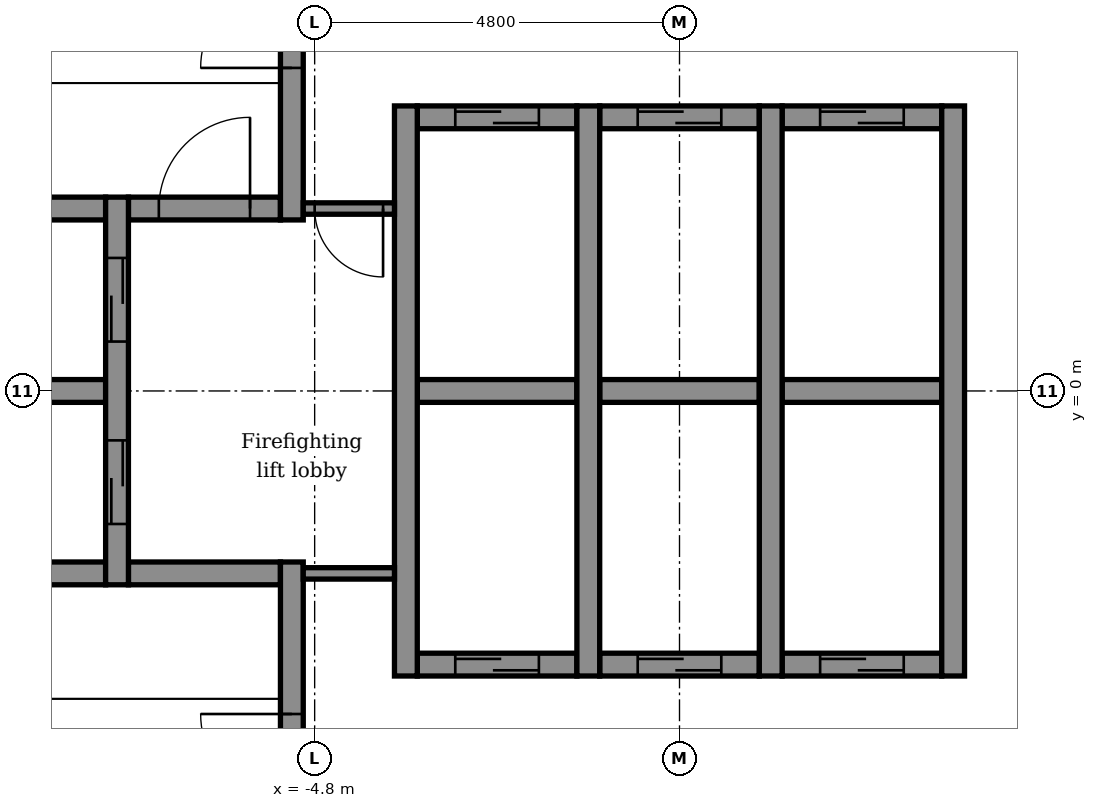
"""IFC4 building model, lengths in metres.
Left out: names, types, materials, properties, quantities, classifications, styles, units other than length and angle.
Written with IfcOpenShell. Run it as: python <this file> out.ifc"""

import sys

from ifc_helpers import new_model, si_unit, direction, frame, frame_2d, origin, place, context, subcontext, project, spatial, rectangle, extrude, element, fill, save


model = new_model("IFC4")
c1 = context("Model", 3, precision=1e-05, world=origin(), true_north=direction((0.0, 1.0)))
c2 = subcontext(c1, "Body", "Model", "MODEL_VIEW")
j1 = project(units=[si_unit("LENGTHUNIT", "METRE"), si_unit("PLANEANGLEUNIT", "RADIAN")], contexts=[c1])
p1 = place(None, origin())
s1 = spatial("IfcSite", under=j1, at=p1, CompositionType="ELEMENT")
p2 = place(p1, origin())
s2 = spatial("IfcBuilding", under=s1, at=p2, CompositionType="ELEMENT")
p3 = place(p2, frame((0.0, 0.0, 289.1)))
s3 = spatial("IfcBuildingStorey", under=s2, at=p3, CompositionType="ELEMENT", Elevation=289.1)
p4 = place(p3, frame((-3.45, -3.6, -0.15), z_axis=(0.0, 0.0, 1.0), x_axis=(1.0, 0.0, 0.0)))
e1 = element("IfcWall", 1, at=p4, inside=s3, PredefinedType="STANDARD", context=c2, shape_type="SweptSolid", body=[
    extrude(rectangle(XDim=2.1, YDim=0.3, at=frame_2d((1.05, 0.0))), origin(), (0.0, 0.0, 1.0), 3.9),
])
p5 = place(p4, frame((0.5, 0.0, 0.15)))
e2 = element("IfcOpeningElement", 2, at=p5, cuts=e1, PredefinedType="OPENING", context=c2, shape_type="SweptSolid", body=[
    extrude(rectangle(XDim=1.1, YDim=2.1, at=frame_2d((0.55, 1.05))), frame((0.0, 0.16, 0.0), z_axis=(0.0, -1.0, 0.0), x_axis=(1.0, 0.0, 0.0)), (0.0, 0.0, 1.0), 0.32),
])
p6 = place(p3, frame((-1.05, -3.6, -0.15), z_axis=(0.0, 0.0, 1.0), x_axis=(1.0, 0.0, 0.0)))
e3 = element("IfcWall", 3, at=p6, inside=s3, PredefinedType="STANDARD", context=c2, shape_type="SweptSolid", body=[
    extrude(rectangle(XDim=2.1, YDim=0.3, at=frame_2d((1.05, 0.0))), origin(), (0.0, 0.0, 1.0), 3.9),
])
p7 = place(p6, frame((0.5, 0.0, 0.15)))
e4 = element("IfcOpeningElement", 4, at=p7, cuts=e3, PredefinedType="OPENING", context=c2, shape_type="SweptSolid", body=[
    extrude(rectangle(XDim=1.1, YDim=2.1, at=frame_2d((0.55, 1.05))), frame((0.0, 0.16, 0.0), z_axis=(0.0, -1.0, 0.0), x_axis=(1.0, 0.0, 0.0)), (0.0, 0.0, 1.0), 0.32),
])
p8 = place(p3, frame((1.35, -3.6, -0.15), z_axis=(0.0, 0.0, 1.0), x_axis=(1.0, 0.0, 0.0)))
e5 = element("IfcWall", 5, at=p8, inside=s3, PredefinedType="STANDARD", context=c2, shape_type="SweptSolid", body=[
    extrude(rectangle(XDim=2.1, YDim=0.3, at=frame_2d((1.05, 0.0))), origin(), (0.0, 0.0, 1.0), 3.9),
])
p9 = place(p8, frame((0.5, 0.0, 0.15)))
e6 = element("IfcOpeningElement", 6, at=p9, cuts=e5, PredefinedType="OPENING", context=c2, shape_type="SweptSolid", body=[
    extrude(rectangle(XDim=1.1, YDim=2.1, at=frame_2d((0.55, 1.05))), frame((0.0, 0.16, 0.0), z_axis=(0.0, -1.0, 0.0), x_axis=(1.0, 0.0, 0.0)), (0.0, 0.0, 1.0), 0.32),
])
p10 = place(p3, frame((-9.45, -2.4, -0.15), z_axis=(0.0, 0.0, 1.0), x_axis=(1.0, 0.0, 0.0)))
e7 = element("IfcWall", 7, at=p10, inside=s3, PredefinedType="STANDARD", context=c2, shape_type="SweptSolid", body=[
    extrude(rectangle(XDim=1.9, YDim=0.3, at=frame_2d((0.95, 0.0))), origin(), (0.0, 0.0, 1.0), 3.9),
])
p11 = place(p3, frame((-7.25, -2.4, -0.15), z_axis=(0.0, 0.0, 1.0), x_axis=(1.0, 0.0, 0.0)))
e8 = element("IfcWall", 8, at=p11, inside=s3, PredefinedType="STANDARD", context=c2, shape_type="SweptSolid", body=[
    extrude(rectangle(XDim=2.0, YDim=0.3, at=frame_2d((1.0, 0.0))), origin(), (0.0, 0.0, 1.0), 3.9),
])
p12 = place(p3, frame((-10.85, 0.0, -0.15), z_axis=(0.0, 0.0, 1.0), x_axis=(1.0, 0.0, 0.0)))
e9 = element("IfcWall", 9, at=p12, inside=s3, PredefinedType="STANDARD", context=c2, shape_type="SweptSolid", body=[
    extrude(rectangle(XDim=3.3, YDim=0.3, at=frame_2d((1.65, 0.0))), origin(), (0.0, 0.0, 1.0), 3.9),
])
p13 = place(p3, frame((-3.45, 0.0, -0.15), z_axis=(0.0, 0.0, 1.0), x_axis=(1.0, 0.0, 0.0)))
e10 = element("IfcWall", 10, at=p13, inside=s3, PredefinedType="STANDARD", context=c2, shape_type="SweptSolid", body=[
    extrude(rectangle(XDim=2.1, YDim=0.3, at=frame_2d((1.05, 0.0))), origin(), (0.0, 0.0, 1.0), 3.9),
])
p14 = place(p3, frame((-1.05, 0.0, -0.15), z_axis=(0.0, 0.0, 1.0), x_axis=(1.0, 0.0, 0.0)))
e11 = element("IfcWall", 11, at=p14, inside=s3, PredefinedType="STANDARD", context=c2, shape_type="SweptSolid", body=[
    extrude(rectangle(XDim=2.1, YDim=0.3, at=frame_2d((1.05, 0.0))), origin(), (0.0, 0.0, 1.0), 3.9),
])
p15 = place(p3, frame((1.35, 0.0, -0.15), z_axis=(0.0, 0.0, 1.0), x_axis=(1.0, 0.0, 0.0)))
e12 = element("IfcWall", 12, at=p15, inside=s3, PredefinedType="STANDARD", context=c2, shape_type="SweptSolid", body=[
    extrude(rectangle(XDim=2.1, YDim=0.3, at=frame_2d((1.05, 0.0))), origin(), (0.0, 0.0, 1.0), 3.9),
])
p16 = place(p3, frame((-9.45, 2.4, -0.15), z_axis=(0.0, 0.0, 1.0), x_axis=(1.0, 0.0, 0.0)))
e13 = element("IfcWall", 13, at=p16, inside=s3, PredefinedType="STANDARD", context=c2, shape_type="SweptSolid", body=[
    extrude(rectangle(XDim=1.9, YDim=0.3, at=frame_2d((0.95, 0.0))), origin(), (0.0, 0.0, 1.0), 3.9),
])
p17 = place(p3, frame((-7.25, 2.4, -0.15), z_axis=(0.0, 0.0, 1.0), x_axis=(1.0, 0.0, 0.0)))
e14 = element("IfcWall", 14, at=p17, inside=s3, PredefinedType="STANDARD", context=c2, shape_type="SweptSolid", body=[
    extrude(rectangle(XDim=2.0, YDim=0.3, at=frame_2d((1.0, 0.0))), origin(), (0.0, 0.0, 1.0), 3.9),
])
p18 = place(p17, frame((0.4, 0.0, 0.15)))
e15 = element("IfcOpeningElement", 15, at=p18, cuts=e14, PredefinedType="OPENING", context=c2, shape_type="SweptSolid", body=[
    extrude(rectangle(XDim=1.2, YDim=2.1, at=frame_2d((0.6, 1.05))), frame((0.0, 0.16, 0.0), z_axis=(0.0, -1.0, 0.0), x_axis=(1.0, 0.0, 0.0)), (0.0, 0.0, 1.0), 0.32),
])
p19 = place(p3, frame((-3.45, 3.6, -0.15), z_axis=(0.0, 0.0, 1.0), x_axis=(1.0, 0.0, 0.0)))
e16 = element("IfcWall", 16, at=p19, inside=s3, PredefinedType="STANDARD", context=c2, shape_type="SweptSolid", body=[
    extrude(rectangle(XDim=2.1, YDim=0.3, at=frame_2d((1.05, 0.0))), origin(), (0.0, 0.0, 1.0), 3.9),
])
p20 = place(p19, frame((0.5, 0.0, 0.15)))
e17 = element("IfcOpeningElement", 17, at=p20, cuts=e16, PredefinedType="OPENING", context=c2, shape_type="SweptSolid", body=[
    extrude(rectangle(XDim=1.1, YDim=2.1, at=frame_2d((0.55, 1.05))), frame((0.0, 0.16, 0.0), z_axis=(0.0, -1.0, 0.0), x_axis=(1.0, 0.0, 0.0)), (0.0, 0.0, 1.0), 0.32),
])
p21 = place(p3, frame((-1.05, 3.6, -0.15), z_axis=(0.0, 0.0, 1.0), x_axis=(1.0, 0.0, 0.0)))
e18 = element("IfcWall", 18, at=p21, inside=s3, PredefinedType="STANDARD", context=c2, shape_type="SweptSolid", body=[
    extrude(rectangle(XDim=2.1, YDim=0.3, at=frame_2d((1.05, 0.0))), origin(), (0.0, 0.0, 1.0), 3.9),
])
p22 = place(p21, frame((0.5, 0.0, 0.15)))
e19 = element("IfcOpeningElement", 19, at=p22, cuts=e18, PredefinedType="OPENING", context=c2, shape_type="SweptSolid", body=[
    extrude(rectangle(XDim=1.1, YDim=2.1, at=frame_2d((0.55, 1.05))), frame((0.0, 0.16, 0.0), z_axis=(0.0, -1.0, 0.0), x_axis=(1.0, 0.0, 0.0)), (0.0, 0.0, 1.0), 0.32),
])
p23 = place(p3, frame((1.35, 3.6, -0.15), z_axis=(0.0, 0.0, 1.0), x_axis=(1.0, 0.0, 0.0)))
e20 = element("IfcWall", 20, at=p23, inside=s3, PredefinedType="STANDARD", context=c2, shape_type="SweptSolid", body=[
    extrude(rectangle(XDim=2.1, YDim=0.3, at=frame_2d((1.05, 0.0))), origin(), (0.0, 0.0, 1.0), 3.9),
])
p24 = place(p23, frame((0.5, 0.0, 0.15)))
e21 = element("IfcOpeningElement", 21, at=p24, cuts=e20, PredefinedType="OPENING", context=c2, shape_type="SweptSolid", body=[
    extrude(rectangle(XDim=1.1, YDim=2.1, at=frame_2d((0.55, 1.05))), frame((0.0, 0.16, 0.0), z_axis=(0.0, -1.0, 0.0), x_axis=(1.0, 0.0, 0.0)), (0.0, 0.0, 1.0), 0.32),
])
p25 = place(p3, frame((-7.4, -2.55, -0.15), z_axis=(0.0, 0.0, 1.0), x_axis=(0.0, 1.0, 0.0)))
e22 = element("IfcWall", 22, at=p25, inside=s3, PredefinedType="STANDARD", context=c2, shape_type="SweptSolid", body=[
    extrude(rectangle(XDim=5.1, YDim=0.3, at=frame_2d((2.55, 0.0))), origin(), (0.0, 0.0, 1.0), 3.9),
])
p26 = place(p25, frame((0.8, 0.0, 0.15)))
e23 = element("IfcOpeningElement", 23, at=p26, cuts=e22, PredefinedType="OPENING", context=c2, shape_type="SweptSolid", body=[
    extrude(rectangle(XDim=1.1, YDim=2.1, at=frame_2d((0.55, 1.05))), frame((0.0, 0.16, 0.0), z_axis=(0.0, -1.0, 0.0), x_axis=(1.0, 0.0, 0.0)), (0.0, 0.0, 1.0), 0.32),
])
p27 = place(p25, frame((3.2, 0.0, 0.15)))
e24 = element("IfcOpeningElement", 24, at=p27, cuts=e22, PredefinedType="OPENING", context=c2, shape_type="SweptSolid", body=[
    extrude(rectangle(XDim=1.1, YDim=2.1, at=frame_2d((0.55, 1.05))), frame((0.0, 0.16, 0.0), z_axis=(0.0, -1.0, 0.0), x_axis=(1.0, 0.0, 0.0)), (0.0, 0.0, 1.0), 0.32),
])
p28 = place(p3, frame((-5.1, -9.325, -0.15), z_axis=(0.0, 0.0, 1.0), x_axis=(0.0, 1.0, 0.0)))
e25 = element("IfcWall", 25, at=p28, inside=s3, PredefinedType="STANDARD", context=c2, shape_type="SweptSolid", body=[
    extrude(rectangle(XDim=7.075, YDim=0.3, at=frame_2d((3.538, 0.0))), origin(), (0.0, 0.0, 1.0), 3.9),
])
p29 = place(p28, frame((3.875, 0.0, 0.15)))
e26 = element("IfcOpeningElement", 26, at=p29, cuts=e25, PredefinedType="OPENING", context=c2, shape_type="SweptSolid", body=[
    extrude(rectangle(XDim=1.2, YDim=2.1, at=frame_2d((0.6, 1.05))), frame((0.0, 0.16, 0.0), z_axis=(0.0, -1.0, 0.0), x_axis=(1.0, 0.0, 0.0)), (0.0, 0.0, 1.0), 0.32),
])
p30 = place(p3, frame((-5.1, 2.25, -0.15), z_axis=(0.0, 0.0, 1.0), x_axis=(0.0, 1.0, 0.0)))
e27 = element("IfcWall", 27, at=p30, inside=s3, PredefinedType="STANDARD", context=c2, shape_type="SweptSolid", body=[
    extrude(rectangle(XDim=7.075, YDim=0.3, at=frame_2d((3.538, 0.0))), origin(), (0.0, 0.0, 1.0), 3.9),
])
p31 = place(p30, frame((2.0, 0.0, 0.15)))
e28 = element("IfcOpeningElement", 28, at=p31, cuts=e27, PredefinedType="OPENING", context=c2, shape_type="SweptSolid", body=[
    extrude(rectangle(XDim=1.2, YDim=2.1, at=frame_2d((0.6, 1.05))), frame((0.0, 0.16, 0.0), z_axis=(0.0, -1.0, 0.0), x_axis=(1.0, 0.0, 0.0)), (0.0, 0.0, 1.0), 0.32),
])
for number, where, z_axis, x_axis in (
    (29, (-3.6, -3.75, -0.15), (0.0, 0.0, 1.0), (0.0, 1.0, 0.0)),
    (30, (-1.2, -3.75, -0.15), (0.0, 0.0, 1.0), (0.0, 1.0, 0.0)),
    (31, (1.2, -3.75, -0.15), (0.0, 0.0, 1.0), (0.0, 1.0, 0.0)),
    (32, (3.6, -3.75, -0.15), (0.0, 0.0, 1.0), (0.0, 1.0, 0.0)),
):
    element("IfcWall", number, at=place(p3, frame(where, z_axis=z_axis, x_axis=x_axis)), inside=s3, PredefinedType="STANDARD", context=c2, shape_type="SweptSolid", body=[
        extrude(rectangle(XDim=7.5, YDim=0.3, at=frame_2d((3.75, 0.0))), origin(), (0.0, 0.0, 1.0), 3.9),
    ])
p32 = place(p3, frame((-4.95, 2.4, 0.0), z_axis=(0.0, 0.0, 1.0), x_axis=(1.0, 0.0, 0.0)))
e33 = element("IfcWall", 33, at=p32, inside=s3, PredefinedType="PARTITIONING", context=c2, shape_type="SweptSolid", body=[
    extrude(rectangle(XDim=1.2, YDim=0.15, at=frame_2d((0.6, 0.0))), origin(), (0.0, 0.0, 1.0), 3.75),
])
p33 = place(p32, frame((0.15, 0.0, 0.0)))
e34 = element("IfcOpeningElement", 34, at=p33, cuts=e33, PredefinedType="OPENING", context=c2, shape_type="SweptSolid", body=[
    extrude(rectangle(XDim=0.9, YDim=2.1, at=frame_2d((0.45, 1.05))), frame((0.0, 0.085, 0.0), z_axis=(0.0, -1.0, 0.0), x_axis=(1.0, 0.0, 0.0)), (0.0, 0.0, 1.0), 0.17),
])
p34 = place(p3, frame((-4.95, -2.4, 0.0), z_axis=(0.0, 0.0, 1.0), x_axis=(1.0, 0.0, 0.0)))
e35 = element("IfcWall", 35, at=p34, inside=s3, PredefinedType="PARTITIONING", context=c2, shape_type="SweptSolid", body=[
    extrude(rectangle(XDim=1.2, YDim=0.15, at=frame_2d((0.6, 0.0))), origin(), (0.0, 0.0, 1.0), 3.75),
])
p35 = place(p26, origin())
e36 = element("IfcDoor", 36, at=p35, inside=s3, OperationType="DOUBLE_DOOR_SLIDING", PredefinedType="DOOR", context=c2, shape_type="SweptSolid", body=[
    extrude(rectangle(XDim=1.1, YDim=2.1, at=frame_2d((0.55, 1.05))), frame((0.0, 0.025, 0.0), z_axis=(0.0, -1.0, 0.0), x_axis=(1.0, 0.0, 0.0)), (0.0, 0.0, 1.0), 0.05),
])
fill(e23, e36)
p36 = place(p27, origin())
e37 = element("IfcDoor", 37, at=p36, inside=s3, OperationType="DOUBLE_DOOR_SLIDING", PredefinedType="DOOR", context=c2, shape_type="SweptSolid", body=[
    extrude(rectangle(XDim=1.1, YDim=2.1, at=frame_2d((0.55, 1.05))), frame((0.0, 0.025, 0.0), z_axis=(0.0, -1.0, 0.0), x_axis=(1.0, 0.0, 0.0)), (0.0, 0.0, 1.0), 0.05),
])
fill(e24, e37)
p37 = place(p20, origin())
e38 = element("IfcDoor", 38, at=p37, inside=s3, OperationType="DOUBLE_DOOR_SLIDING", PredefinedType="DOOR", context=c2, shape_type="SweptSolid", body=[
    extrude(rectangle(XDim=1.1, YDim=2.1, at=frame_2d((0.55, 1.05))), frame((0.0, 0.025, 0.0), z_axis=(0.0, -1.0, 0.0), x_axis=(1.0, 0.0, 0.0)), (0.0, 0.0, 1.0), 0.05),
])
fill(e17, e38)
p38 = place(p22, origin())
e39 = element("IfcDoor", 39, at=p38, inside=s3, OperationType="DOUBLE_DOOR_SLIDING", PredefinedType="DOOR", context=c2, shape_type="SweptSolid", body=[
    extrude(rectangle(XDim=1.1, YDim=2.1, at=frame_2d((0.55, 1.05))), frame((0.0, 0.025, 0.0), z_axis=(0.0, -1.0, 0.0), x_axis=(1.0, 0.0, 0.0)), (0.0, 0.0, 1.0), 0.05),
])
fill(e19, e39)
p39 = place(p24, origin())
e40 = element("IfcDoor", 40, at=p39, inside=s3, OperationType="DOUBLE_DOOR_SLIDING", PredefinedType="DOOR", context=c2, shape_type="SweptSolid", body=[
    extrude(rectangle(XDim=1.1, YDim=2.1, at=frame_2d((0.55, 1.05))), frame((0.0, 0.025, 0.0), z_axis=(0.0, -1.0, 0.0), x_axis=(1.0, 0.0, 0.0)), (0.0, 0.0, 1.0), 0.05),
])
fill(e21, e40)
p40 = place(p5, origin())
e41 = element("IfcDoor", 41, at=p40, inside=s3, OperationType="DOUBLE_DOOR_SLIDING", PredefinedType="DOOR", context=c2, shape_type="SweptSolid", body=[
    extrude(rectangle(XDim=1.1, YDim=2.1, at=frame_2d((0.55, 1.05))), frame((0.0, 0.025, 0.0), z_axis=(0.0, -1.0, 0.0), x_axis=(1.0, 0.0, 0.0)), (0.0, 0.0, 1.0), 0.05),
])
fill(e2, e41)
p41 = place(p7, origin())
e42 = element("IfcDoor", 42, at=p41, inside=s3, OperationType="DOUBLE_DOOR_SLIDING", PredefinedType="DOOR", context=c2, shape_type="SweptSolid", body=[
    extrude(rectangle(XDim=1.1, YDim=2.1, at=frame_2d((0.55, 1.05))), frame((0.0, 0.025, 0.0), z_axis=(0.0, -1.0, 0.0), x_axis=(1.0, 0.0, 0.0)), (0.0, 0.0, 1.0), 0.05),
])
fill(e4, e42)
p42 = place(p9, origin())
e43 = element("IfcDoor", 43, at=p42, inside=s3, OperationType="DOUBLE_DOOR_SLIDING", PredefinedType="DOOR", context=c2, shape_type="SweptSolid", body=[
    extrude(rectangle(XDim=1.1, YDim=2.1, at=frame_2d((0.55, 1.05))), frame((0.0, 0.025, 0.0), z_axis=(0.0, -1.0, 0.0), x_axis=(1.0, 0.0, 0.0)), (0.0, 0.0, 1.0), 0.05),
])
fill(e6, e43)
p43 = place(p31, origin())
e44 = element("IfcDoor", 44, at=p43, inside=s3, OperationType="SINGLE_SWING_LEFT", PredefinedType="DOOR", context=c2, shape_type="SweptSolid", body=[
    extrude(rectangle(XDim=1.2, YDim=2.1, at=frame_2d((0.6, 1.05))), frame((0.0, 0.025, 0.0), z_axis=(0.0, -1.0, 0.0), x_axis=(1.0, 0.0, 0.0)), (0.0, 0.0, 1.0), 0.05),
])
fill(e28, e44)
p44 = place(p29, origin())
e45 = element("IfcDoor", 45, at=p44, inside=s3, OperationType="SINGLE_SWING_RIGHT", PredefinedType="DOOR", context=c2, shape_type="SweptSolid", body=[
    extrude(rectangle(XDim=1.2, YDim=2.1, at=frame_2d((0.6, 1.05))), frame((0.0, 0.025, 0.0), z_axis=(0.0, -1.0, 0.0), x_axis=(1.0, 0.0, 0.0)), (0.0, 0.0, 1.0), 0.05),
])
fill(e26, e45)
p45 = place(p33, frame((0.9, 0.0, 0.0), z_axis=(0.0, 0.0, 1.0), x_axis=(-1.0, 0.0, 0.0)))
e46 = element("IfcDoor", 46, at=p45, inside=s3, OperationType="SINGLE_SWING_RIGHT", PredefinedType="DOOR", context=c2, shape_type="SweptSolid", body=[
    extrude(rectangle(XDim=0.9, YDim=2.1, at=frame_2d((0.45, 1.05))), frame((0.0, 0.025, 0.0), z_axis=(0.0, -1.0, 0.0), x_axis=(1.0, 0.0, 0.0)), (0.0, 0.0, 1.0), 0.05),
])
fill(e34, e46)
p46 = place(p18, origin())
e47 = element("IfcDoor", 47, at=p46, inside=s3, OperationType="SINGLE_SWING_RIGHT", PredefinedType="DOOR", context=c2, shape_type="SweptSolid", body=[
    extrude(rectangle(XDim=1.2, YDim=2.1, at=frame_2d((0.6, 1.05))), frame((0.0, 0.025, 0.0), z_axis=(0.0, -1.0, 0.0), x_axis=(1.0, 0.0, 0.0)), (0.0, 0.0, 1.0), 0.05),
])
fill(e15, e47)
save(model, sys.argv[1])
